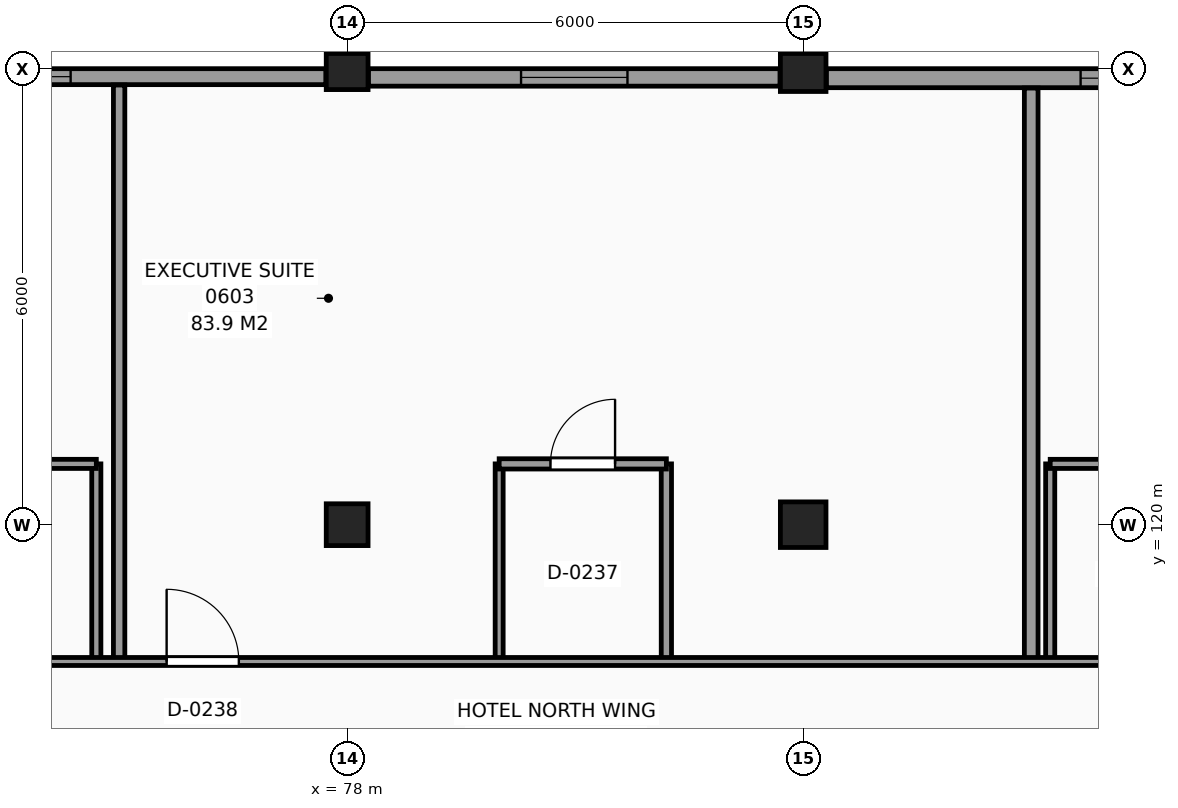
"""IFC4 building model, lengths in metres.
Left out: names, types, materials, properties, quantities, classifications, styles, units other than length and angle.
Written with IfcOpenShell. Run it as: python <this file> out.ifc"""

import sys

from ifc_helpers import new_model, si_unit, direction, frame, frame_2d, origin, origin_2d, place, context, subcontext, project, spatial, rectangle, extrude, element, fill, save


model = new_model("IFC4")
c1 = context("Model", 3, precision=1e-05, world=origin(), true_north=direction((0.0, 1.0)))
c2 = subcontext(c1, "Body", "Model", "MODEL_VIEW")
j1 = project(units=[si_unit("LENGTHUNIT", "METRE"), si_unit("PLANEANGLEUNIT", "RADIAN")], contexts=[c1])
p1 = place(None, origin())
s1 = spatial("IfcSite", under=j1, at=p1, CompositionType="ELEMENT")
p2 = place(p1, origin())
s2 = spatial("IfcBuilding", under=s1, at=p2, CompositionType="ELEMENT")
p3 = place(p2, frame((0.0, 0.0, 28.2)))
s3 = spatial("IfcBuildingStorey", under=s2, at=p3, CompositionType="ELEMENT", Elevation=28.2)
for number, where, z_axis, x_axis in (
    (1, (78.0, 120.0, 0.0), (0.0, 0.0, 1.0), (1.0, 0.0, 0.0)),
    (2, (78.0, 126.0, 0.0), (0.0, 0.0, 1.0), (1.0, 0.0, 0.0)),
):
    element("IfcColumn", number, at=place(p3, frame(where, z_axis=z_axis, x_axis=x_axis)), inside=s3, PredefinedType="COLUMN", context=c2, shape_type="SweptSolid", body=[
        extrude(rectangle(XDim=0.55, YDim=0.55, at=origin_2d()), origin(), (0.0, 0.0, 1.0), 3.3),
    ])
for number, where, z_axis, x_axis in (
    (3, (84.0, 120.0, 0.0), (0.0, 0.0, 1.0), (1.0, 0.0, 0.0)),
    (4, (84.0, 126.0, 0.0), (0.0, 0.0, 1.0), (1.0, 0.0, 0.0)),
):
    element("IfcColumn", number, at=place(p3, frame(where, z_axis=z_axis, x_axis=x_axis)), inside=s3, PredefinedType="COLUMN", context=c2, shape_type="SweptSolid", body=[
        extrude(rectangle(XDim=0.6, YDim=0.6, at=origin_2d()), origin(), (0.0, 0.0, 1.0), 3.3),
    ])
p4 = place(p3, frame((89.72, 125.875, 0.0), z_axis=(0.0, 0.0, 1.0), x_axis=(-1.0, 0.0, 0.0)))
e5 = element("IfcWall", 5, at=p4, inside=s3, PredefinedType="SOLIDWALL", context=c2, shape_type="SweptSolid", body=[
    extrude(rectangle(XDim=5.415, YDim=0.25, at=frame_2d((2.708, 0.0))), origin(), (0.0, 0.0, 1.0), 2.43),
])
p5 = place(p4, frame((0.67, 0.0, 0.8)))
e6 = element("IfcOpeningElement", 6, at=p5, cuts=e5, PredefinedType="OPENING", context=c2, shape_type="SweptSolid", body=[
    extrude(rectangle(XDim=1.4, YDim=1.4, at=frame_2d((0.7, 0.7))), frame((0.0, 0.135, 0.0), z_axis=(0.0, -1.0, 0.0), x_axis=(1.0, 0.0, 0.0)), (0.0, 0.0, 1.0), 0.27),
])
p6 = place(p3, frame((83.695, 125.885, 0.0), z_axis=(0.0, 0.0, 1.0), x_axis=(-1.0, 0.0, 0.0)))
e7 = element("IfcWall", 7, at=p6, inside=s3, PredefinedType="SOLIDWALL", context=c2, shape_type="SweptSolid", body=[
    extrude(rectangle(XDim=5.415, YDim=0.23, at=frame_2d((2.708, 0.0))), origin(), (0.0, 0.0, 1.0), 2.43),
])
p7 = place(p6, frame((2.007, 0.0, 0.8)))
e8 = element("IfcOpeningElement", 8, at=p7, cuts=e7, PredefinedType="OPENING", context=c2, shape_type="SweptSolid", body=[
    extrude(rectangle(XDim=1.4, YDim=1.4, at=frame_2d((0.7, 0.7))), frame((0.0, 0.125, 0.0), z_axis=(0.0, -1.0, 0.0), x_axis=(1.0, 0.0, 0.0)), (0.0, 0.0, 1.0), 0.25),
])
p8 = place(p3, frame((77.72, 125.895, 0.0), z_axis=(0.0, 0.0, 1.0), x_axis=(-1.0, 0.0, 0.0)))
e9 = element("IfcWall", 9, at=p8, inside=s3, PredefinedType="SOLIDWALL", context=c2, shape_type="SweptSolid", body=[
    extrude(rectangle(XDim=5.415, YDim=0.21, at=frame_2d((2.708, 0.0))), origin(), (0.0, 0.0, 1.0), 2.43),
])
p9 = place(p8, frame((3.358, 0.0, 0.8)))
e10 = element("IfcOpeningElement", 10, at=p9, cuts=e9, PredefinedType="OPENING", context=c2, shape_type="SweptSolid", body=[
    extrude(rectangle(XDim=1.4, YDim=1.4, at=frame_2d((0.7, 0.7))), frame((0.0, 0.115, 0.0), z_axis=(0.0, -1.0, 0.0), x_axis=(1.0, 0.0, 0.0)), (0.0, 0.0, 1.0), 0.23),
])
p10 = place(p3, frame((74.7, 118.2, 0.0), z_axis=(0.0, 0.0, 1.0), x_axis=(0.0, 1.0, 0.0)))
e11 = element("IfcWall", 11, at=p10, inside=s3, PredefinedType="PARTITIONING", context=c2, shape_type="SweptSolid", body=[
    extrude(rectangle(XDim=2.6, YDim=0.12, at=frame_2d((1.3, 0.0))), origin(), (0.0, 0.0, 1.0), 3.08),
])
p11 = place(p3, frame((75.0, 118.2, 0.0), z_axis=(0.0, 0.0, 1.0), x_axis=(0.0, 1.0, 0.0)))
e12 = element("IfcWall", 12, at=p11, inside=s3, PredefinedType="PARTITIONING", context=c2, shape_type="SweptSolid", body=[
    extrude(rectangle(XDim=7.585, YDim=0.15, at=frame_2d((3.792, 0.0))), origin(), (0.0, 0.0, 1.0), 3.08),
])
p12 = place(p3, frame((80.0, 118.2, 0.0), z_axis=(0.0, 0.0, 1.0), x_axis=(0.0, 1.0, 0.0)))
e13 = element("IfcWall", 13, at=p12, inside=s3, PredefinedType="PARTITIONING", context=c2, shape_type="SweptSolid", body=[
    extrude(rectangle(XDim=2.6, YDim=0.105, at=frame_2d((1.3, 0.0))), origin(), (0.0, 0.0, 1.0), 3.08),
])
p13 = place(p3, frame((82.2, 118.2, 0.0), z_axis=(0.0, 0.0, 1.0), x_axis=(0.0, 1.0, 0.0)))
e14 = element("IfcWall", 14, at=p13, inside=s3, PredefinedType="PARTITIONING", context=c2, shape_type="SweptSolid", body=[
    extrude(rectangle(XDim=2.6, YDim=0.135, at=frame_2d((1.3, 0.0))), origin(), (0.0, 0.0, 1.0), 3.08),
])
p14 = place(p3, frame((87.0, 118.2, 0.0), z_axis=(0.0, 0.0, 1.0), x_axis=(0.0, 1.0, 0.0)))
e15 = element("IfcWall", 15, at=p14, inside=s3, PredefinedType="PARTITIONING", context=c2, shape_type="SweptSolid", body=[
    extrude(rectangle(XDim=7.545, YDim=0.18, at=frame_2d((3.772, 0.0))), origin(), (0.0, 0.0, 1.0), 3.08),
])
p15 = place(p3, frame((87.25, 118.2, 0.0), z_axis=(0.0, 0.0, 1.0), x_axis=(0.0, 1.0, 0.0)))
e16 = element("IfcWall", 16, at=p15, inside=s3, PredefinedType="PARTITIONING", context=c2, shape_type="SweptSolid", body=[
    extrude(rectangle(XDim=2.6, YDim=0.12, at=frame_2d((1.3, 0.0))), origin(), (0.0, 0.0, 1.0), 3.08),
])
p16 = place(p3, frame((66.235, 118.2, 0.0), z_axis=(0.0, 0.0, 1.0), x_axis=(1.0, 0.0, 0.0)))
e17 = element("IfcWall", 17, at=p16, inside=s3, PredefinedType="PARTITIONING", context=c2, shape_type="SweptSolid", body=[
    extrude(rectangle(XDim=110.265, YDim=0.105, at=frame_2d((55.132, 0.0))), origin(), (0.0, 0.0, 1.0), 3.08),
])
p17 = place(p16, frame((0.49, 0.0, 0.0)))
e18 = element("IfcOpeningElement", 18, at=p17, cuts=e17, PredefinedType="OPENING", context=c2, shape_type="SweptSolid", body=[
    extrude(rectangle(XDim=0.95, YDim=2.1, at=frame_2d((0.475, 1.05))), frame((0.0, 0.062, 0.0), z_axis=(0.0, -1.0, 0.0), x_axis=(1.0, 0.0, 0.0)), (0.0, 0.0, 1.0), 0.125),
])
p18 = place(p16, frame((4.89, 0.0, 0.0)))
e19 = element("IfcOpeningElement", 19, at=p18, cuts=e17, PredefinedType="OPENING", context=c2, shape_type="SweptSolid", body=[
    extrude(rectangle(XDim=0.95, YDim=2.1, at=frame_2d((0.475, 1.05))), frame((0.0, 0.062, 0.0), z_axis=(0.0, -1.0, 0.0), x_axis=(1.0, 0.0, 0.0)), (0.0, 0.0, 1.0), 0.125),
])
p19 = place(p16, frame((9.39, 0.0, 0.0)))
e20 = element("IfcOpeningElement", 20, at=p19, cuts=e17, PredefinedType="OPENING", context=c2, shape_type="SweptSolid", body=[
    extrude(rectangle(XDim=0.95, YDim=2.1, at=frame_2d((0.475, 1.05))), frame((0.0, 0.062, 0.0), z_axis=(0.0, -1.0, 0.0), x_axis=(1.0, 0.0, 0.0)), (0.0, 0.0, 1.0), 0.125),
])
p20 = place(p16, frame((24.09, 0.0, 0.0)))
e21 = element("IfcOpeningElement", 21, at=p20, cuts=e17, PredefinedType="OPENING", context=c2, shape_type="SweptSolid", body=[
    extrude(rectangle(XDim=0.95, YDim=2.1, at=frame_2d((0.475, 1.05))), frame((0.0, 0.062, 0.0), z_axis=(0.0, -1.0, 0.0), x_axis=(1.0, 0.0, 0.0)), (0.0, 0.0, 1.0), 0.125),
])
p21 = place(p16, frame((32.34, 0.0, 0.0)))
e22 = element("IfcOpeningElement", 22, at=p21, cuts=e17, PredefinedType="OPENING", context=c2, shape_type="SweptSolid", body=[
    extrude(rectangle(XDim=0.95, YDim=2.1, at=frame_2d((0.475, 1.05))), frame((0.0, 0.062, 0.0), z_axis=(0.0, -1.0, 0.0), x_axis=(1.0, 0.0, 0.0)), (0.0, 0.0, 1.0), 0.125),
])
p22 = place(p16, frame((34.89, 0.0, 0.0)))
e23 = element("IfcOpeningElement", 23, at=p22, cuts=e17, PredefinedType="OPENING", context=c2, shape_type="SweptSolid", body=[
    extrude(rectangle(XDim=0.95, YDim=2.1, at=frame_2d((0.475, 1.05))), frame((0.0, 0.062, 0.0), z_axis=(0.0, -1.0, 0.0), x_axis=(1.0, 0.0, 0.0)), (0.0, 0.0, 1.0), 0.125),
])
p23 = place(p16, frame((42.09, 0.0, 0.0)))
e24 = element("IfcOpeningElement", 24, at=p23, cuts=e17, PredefinedType="OPENING", context=c2, shape_type="SweptSolid", body=[
    extrude(rectangle(XDim=0.95, YDim=2.1, at=frame_2d((0.475, 1.05))), frame((0.0, 0.062, 0.0), z_axis=(0.0, -1.0, 0.0), x_axis=(1.0, 0.0, 0.0)), (0.0, 0.0, 1.0), 0.125),
])
p24 = place(p16, frame((46.29, 0.0, 0.0)))
e25 = element("IfcOpeningElement", 25, at=p24, cuts=e17, PredefinedType="OPENING", context=c2, shape_type="SweptSolid", body=[
    extrude(rectangle(XDim=0.95, YDim=2.1, at=frame_2d((0.475, 1.05))), frame((0.0, 0.062, 0.0), z_axis=(0.0, -1.0, 0.0), x_axis=(1.0, 0.0, 0.0)), (0.0, 0.0, 1.0), 0.125),
])
p25 = place(p16, frame((48.49, 0.0, 0.0)))
e26 = element("IfcOpeningElement", 26, at=p25, cuts=e17, PredefinedType="OPENING", context=c2, shape_type="SweptSolid", body=[
    extrude(rectangle(XDim=0.95, YDim=2.1, at=frame_2d((0.475, 1.05))), frame((0.0, 0.062, 0.0), z_axis=(0.0, -1.0, 0.0), x_axis=(1.0, 0.0, 0.0)), (0.0, 0.0, 1.0), 0.125),
])
p26 = place(p16, frame((54.49, 0.0, 0.0)))
e27 = element("IfcOpeningElement", 27, at=p26, cuts=e17, PredefinedType="OPENING", context=c2, shape_type="SweptSolid", body=[
    extrude(rectangle(XDim=0.95, YDim=2.1, at=frame_2d((0.475, 1.05))), frame((0.0, 0.062, 0.0), z_axis=(0.0, -1.0, 0.0), x_axis=(1.0, 0.0, 0.0)), (0.0, 0.0, 1.0), 0.125),
])
p27 = place(p16, frame((64.29, 0.0, 0.0)))
e28 = element("IfcOpeningElement", 28, at=p27, cuts=e17, PredefinedType="OPENING", context=c2, shape_type="SweptSolid", body=[
    extrude(rectangle(XDim=0.95, YDim=2.1, at=frame_2d((0.475, 1.05))), frame((0.0, 0.062, 0.0), z_axis=(0.0, -1.0, 0.0), x_axis=(1.0, 0.0, 0.0)), (0.0, 0.0, 1.0), 0.125),
])
p28 = place(p16, frame((66.49, 0.0, 0.0)))
e29 = element("IfcOpeningElement", 29, at=p28, cuts=e17, PredefinedType="OPENING", context=c2, shape_type="SweptSolid", body=[
    extrude(rectangle(XDim=0.95, YDim=2.1, at=frame_2d((0.475, 1.05))), frame((0.0, 0.062, 0.0), z_axis=(0.0, -1.0, 0.0), x_axis=(1.0, 0.0, 0.0)), (0.0, 0.0, 1.0), 0.125),
])
p29 = place(p16, frame((70.89, 0.0, 0.0)))
e30 = element("IfcOpeningElement", 30, at=p29, cuts=e17, PredefinedType="OPENING", context=c2, shape_type="SweptSolid", body=[
    extrude(rectangle(XDim=0.95, YDim=2.1, at=frame_2d((0.475, 1.05))), frame((0.0, 0.062, 0.0), z_axis=(0.0, -1.0, 0.0), x_axis=(1.0, 0.0, 0.0)), (0.0, 0.0, 1.0), 0.125),
])
p30 = place(p16, frame((78.09, 0.0, 0.0)))
e31 = element("IfcOpeningElement", 31, at=p30, cuts=e17, PredefinedType="OPENING", context=c2, shape_type="SweptSolid", body=[
    extrude(rectangle(XDim=0.95, YDim=2.1, at=frame_2d((0.475, 1.05))), frame((0.0, 0.062, 0.0), z_axis=(0.0, -1.0, 0.0), x_axis=(1.0, 0.0, 0.0)), (0.0, 0.0, 1.0), 0.125),
])
p31 = place(p16, frame((86.34, 0.0, 0.0)))
e32 = element("IfcOpeningElement", 32, at=p31, cuts=e17, PredefinedType="OPENING", context=c2, shape_type="SweptSolid", body=[
    extrude(rectangle(XDim=0.95, YDim=2.1, at=frame_2d((0.475, 1.05))), frame((0.0, 0.062, 0.0), z_axis=(0.0, -1.0, 0.0), x_axis=(1.0, 0.0, 0.0)), (0.0, 0.0, 1.0), 0.125),
])
p32 = place(p16, frame((88.89, 0.0, 0.0)))
e33 = element("IfcOpeningElement", 33, at=p32, cuts=e17, PredefinedType="OPENING", context=c2, shape_type="SweptSolid", body=[
    extrude(rectangle(XDim=0.95, YDim=2.1, at=frame_2d((0.475, 1.05))), frame((0.0, 0.062, 0.0), z_axis=(0.0, -1.0, 0.0), x_axis=(1.0, 0.0, 0.0)), (0.0, 0.0, 1.0), 0.125),
])
p33 = place(p16, frame((93.39, 0.0, 0.0)))
e34 = element("IfcOpeningElement", 34, at=p33, cuts=e17, PredefinedType="OPENING", context=c2, shape_type="SweptSolid", body=[
    extrude(rectangle(XDim=0.95, YDim=2.1, at=frame_2d((0.475, 1.05))), frame((0.0, 0.062, 0.0), z_axis=(0.0, -1.0, 0.0), x_axis=(1.0, 0.0, 0.0)), (0.0, 0.0, 1.0), 0.125),
])
p34 = place(p16, frame((104.99, 0.0, 0.0)))
e35 = element("IfcOpeningElement", 35, at=p34, cuts=e17, PredefinedType="OPENING", context=c2, shape_type="SweptSolid", body=[
    extrude(rectangle(XDim=0.95, YDim=2.1, at=frame_2d((0.475, 1.05))), frame((0.0, 0.062, 0.0), z_axis=(0.0, -1.0, 0.0), x_axis=(1.0, 0.0, 0.0)), (0.0, 0.0, 1.0), 0.125),
])
p35 = place(p3, frame((72.5, 120.8, 0.0), z_axis=(0.0, 0.0, 1.0), x_axis=(1.0, 0.0, 0.0)))
e36 = element("IfcWall", 36, at=p35, inside=s3, PredefinedType="PARTITIONING", context=c2, shape_type="SweptSolid", body=[
    extrude(rectangle(XDim=2.2, YDim=0.12, at=frame_2d((1.1, 0.0))), origin(), (0.0, 0.0, 1.0), 3.08),
])
p36 = place(p35, frame((0.675, 0.0, 0.0)))
e37 = element("IfcOpeningElement", 37, at=p36, cuts=e36, PredefinedType="OPENING", context=c2, shape_type="SweptSolid", body=[
    extrude(rectangle(XDim=0.85, YDim=2.1, at=frame_2d((0.425, 1.05))), frame((0.0, 0.07, 0.0), z_axis=(0.0, -1.0, 0.0), x_axis=(1.0, 0.0, 0.0)), (0.0, 0.0, 1.0), 0.14),
])
p37 = place(p3, frame((80.0, 120.8, 0.0), z_axis=(0.0, 0.0, 1.0), x_axis=(1.0, 0.0, 0.0)))
e38 = element("IfcWall", 38, at=p37, inside=s3, PredefinedType="PARTITIONING", context=c2, shape_type="SweptSolid", body=[
    extrude(rectangle(XDim=2.2, YDim=0.135, at=frame_2d((1.1, 0.0))), origin(), (0.0, 0.0, 1.0), 3.08),
])
p38 = place(p37, frame((0.675, 0.0, 0.0)))
e39 = element("IfcOpeningElement", 39, at=p38, cuts=e38, PredefinedType="OPENING", context=c2, shape_type="SweptSolid", body=[
    extrude(rectangle(XDim=0.85, YDim=2.1, at=frame_2d((0.425, 1.05))), frame((0.0, 0.078, 0.0), z_axis=(0.0, -1.0, 0.0), x_axis=(1.0, 0.0, 0.0)), (0.0, 0.0, 1.0), 0.155),
])
p39 = place(p3, frame((87.25, 120.8, 0.0), z_axis=(0.0, 0.0, 1.0), x_axis=(1.0, 0.0, 0.0)))
e40 = element("IfcWall", 40, at=p39, inside=s3, PredefinedType="PARTITIONING", context=c2, shape_type="SweptSolid", body=[
    extrude(rectangle(XDim=2.2, YDim=0.12, at=frame_2d((1.1, 0.0))), origin(), (0.0, 0.0, 1.0), 3.08),
])
p40 = place(p39, frame((0.675, 0.0, 0.0)))
e41 = element("IfcOpeningElement", 41, at=p40, cuts=e40, PredefinedType="OPENING", context=c2, shape_type="SweptSolid", body=[
    extrude(rectangle(XDim=0.85, YDim=2.1, at=frame_2d((0.425, 1.05))), frame((0.0, 0.07, 0.0), z_axis=(0.0, -1.0, 0.0), x_axis=(1.0, 0.0, 0.0)), (0.0, 0.0, 1.0), 0.14),
])
p41 = place(p9, origin())
e42 = element("IfcWindow", 42, at=p41, inside=s3, PartitioningType="SINGLE_PANEL", PredefinedType="WINDOW", context=c2, shape_type="SweptSolid", body=[
    extrude(rectangle(XDim=1.4, YDim=1.4, at=frame_2d((0.7, 0.7))), frame((0.0, 0.03, 0.0), z_axis=(0.0, -1.0, 0.0), x_axis=(1.0, 0.0, 0.0)), (0.0, 0.0, 1.0), 0.06),
])
fill(e10, e42)
p42 = place(p7, origin())
e43 = element("IfcWindow", 43, at=p42, inside=s3, PartitioningType="SINGLE_PANEL", PredefinedType="WINDOW", context=c2, shape_type="SweptSolid", body=[
    extrude(rectangle(XDim=1.4, YDim=1.4, at=frame_2d((0.7, 0.7))), frame((0.0, 0.03, 0.0), z_axis=(0.0, -1.0, 0.0), x_axis=(1.0, 0.0, 0.0)), (0.0, 0.0, 1.0), 0.06),
])
fill(e8, e43)
p43 = place(p5, origin())
e44 = element("IfcWindow", 44, at=p43, inside=s3, PartitioningType="SINGLE_PANEL", PredefinedType="WINDOW", context=c2, shape_type="SweptSolid", body=[
    extrude(rectangle(XDim=1.4, YDim=1.4, at=frame_2d((0.7, 0.7))), frame((0.0, 0.03, 0.0), z_axis=(0.0, -1.0, 0.0), x_axis=(1.0, 0.0, 0.0)), (0.0, 0.0, 1.0), 0.06),
])
fill(e6, e44)
p44 = place(p38, origin())
e45 = element("IfcDoor", 45, at=p44, inside=s3, OperationType="SINGLE_SWING_RIGHT", PredefinedType="DOOR", context=c2, shape_type="SweptSolid", body=[
    extrude(rectangle(XDim=0.85, YDim=2.1, at=frame_2d((0.425, 1.05))), frame((0.0, 0.025, 0.0), z_axis=(0.0, -1.0, 0.0), x_axis=(1.0, 0.0, 0.0)), (0.0, 0.0, 1.0), 0.05),
])
fill(e39, e45)
p45 = place(p19, origin())
e46 = element("IfcDoor", 46, at=p45, inside=s3, OperationType="SINGLE_SWING_LEFT", PredefinedType="DOOR", context=c2, shape_type="SweptSolid", body=[
    extrude(rectangle(XDim=0.95, YDim=2.1, at=frame_2d((0.475, 1.05))), frame((0.0, 0.025, 0.0), z_axis=(0.0, -1.0, 0.0), x_axis=(1.0, 0.0, 0.0)), (0.0, 0.0, 1.0), 0.05),
])
fill(e20, e46)
save(model, sys.argv[1])
